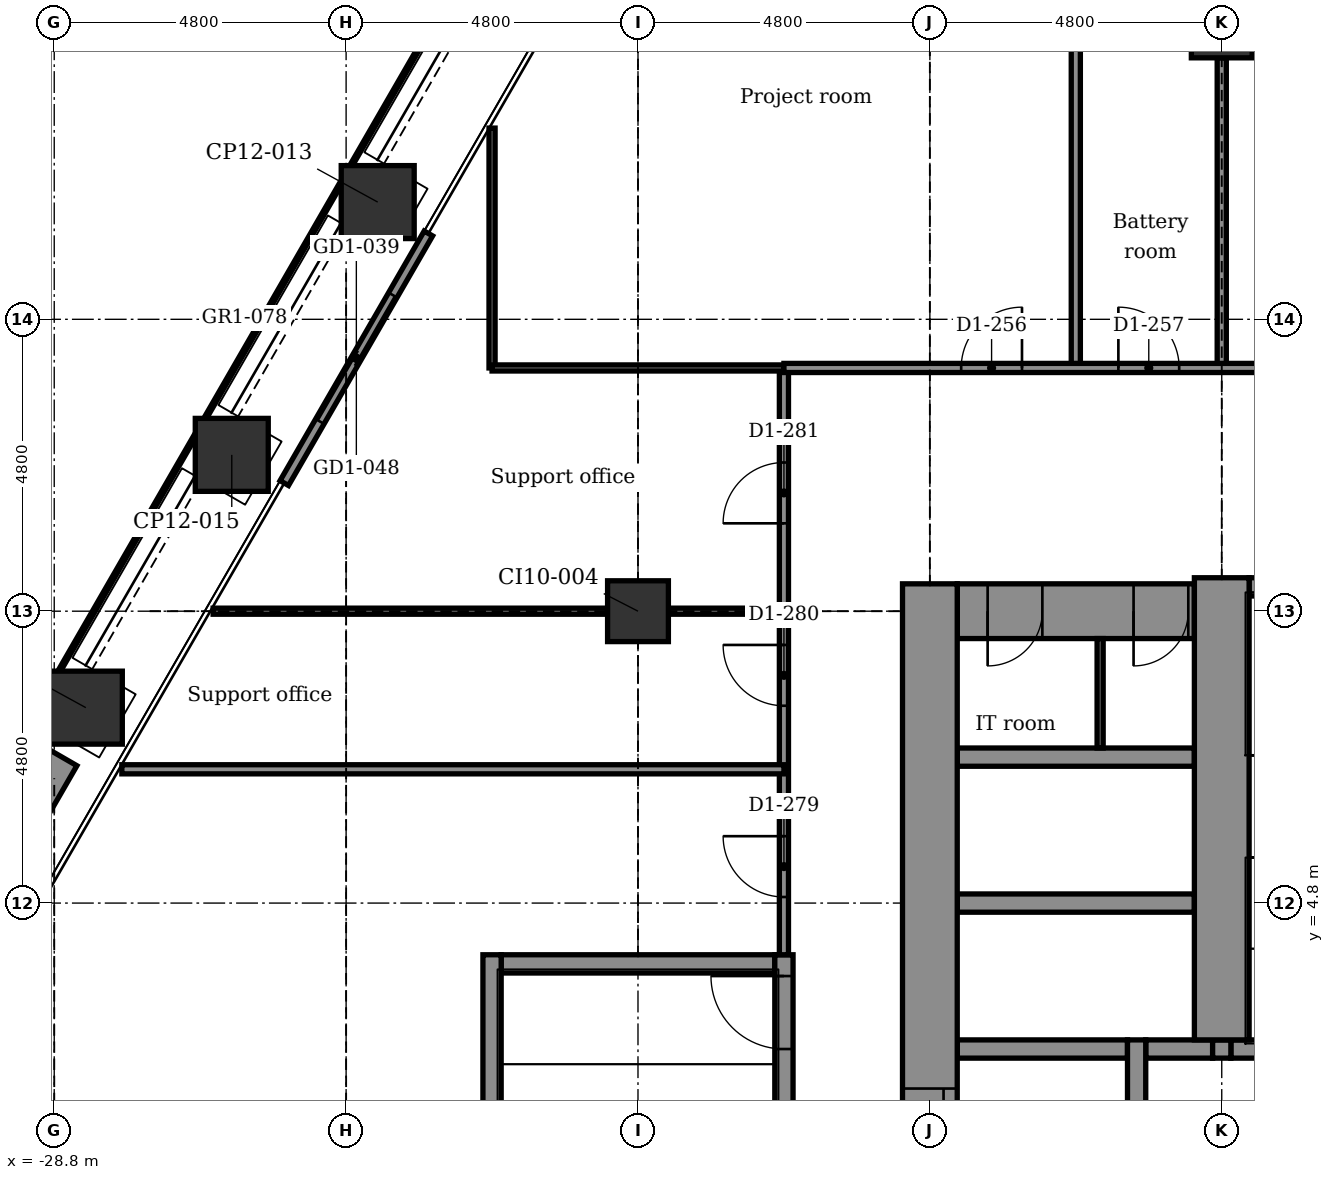
"""IFC4 building model, lengths in metres.
Left out: names, types, materials, properties, quantities, classifications, styles, units other than length and angle.
Written with IfcOpenShell. Run it as: python <this file> out.ifc"""

import sys

from ifc_helpers import new_model, si_unit, direction, frame, frame_2d, origin, origin_2d, place, context, subcontext, project, spatial, rectangle, extrude, element, fill, save


model = new_model("IFC4")
c1 = context("Model", 3, precision=1e-05, world=origin(), true_north=direction((0.0, 1.0)))
c2 = subcontext(c1, "Body", "Model", "MODEL_VIEW")
j1 = project(units=[si_unit("LENGTHUNIT", "METRE"), si_unit("PLANEANGLEUNIT", "RADIAN")], contexts=[c1])
p1 = place(None, origin())
s1 = spatial("IfcSite", under=j1, at=p1, CompositionType="ELEMENT")
p2 = place(p1, origin())
s2 = spatial("IfcBuilding", under=s1, at=p2, CompositionType="ELEMENT")
p3 = place(p2, frame((0.0, 0.0, 95.9)))
s3 = spatial("IfcBuildingStorey", under=s2, at=p3, CompositionType="ELEMENT", Elevation=95.9)
for number, where, z_axis, x_axis in (
    (1, (-28.28, 8.014, -0.2), (0.0, 0.0, 1.0), (0.5, 0.866, 0.0)),
    (2, (-25.88, 12.171, -0.2), (0.0, 0.0, 1.0), (0.5, 0.866, 0.0)),
    (3, (-23.48, 16.328, -0.2), (0.0, 0.0, 1.0), (0.5, 0.866, 0.0)),
):
    element("IfcColumn", number, at=place(p3, frame(where, z_axis=z_axis, x_axis=x_axis)), inside=s3, PredefinedType="COLUMN", context=c2, shape_type="SweptSolid", body=[
        extrude(rectangle(XDim=1.2, YDim=1.2, at=origin_2d()), origin(), (0.0, 0.0, 1.0), 4.5),
    ])
for number, where, z_axis, x_axis in (
    (4, (-19.2, 9.6, -0.2), (0.0, 0.0, 1.0), (1.0, 0.0, 0.0)),
    (5, (-9.6, 19.2, -0.2), (0.0, 0.0, 1.0), (1.0, 0.0, 0.0)),
):
    element("IfcColumn", number, at=place(p3, frame(where, z_axis=z_axis, x_axis=x_axis)), inside=s3, PredefinedType="COLUMN", context=c2, shape_type="SweptSolid", body=[
        extrude(rectangle(XDim=1.0, YDim=1.0, at=origin_2d()), origin(), (0.0, 0.0, 1.0), 4.5),
    ])
p4 = place(p3, frame((-13.95, 2.4, -0.2), z_axis=(0.0, 0.0, 1.0), x_axis=(1.0, 0.0, 0.0)))
e6 = element("IfcWall", 6, at=p4, inside=s3, PredefinedType="STANDARD", context=c2, shape_type="SweptSolid", body=[
    extrude(rectangle(XDim=2.8, YDim=0.3, at=frame_2d((1.4, 0.0))), origin(), (0.0, 0.0, 1.0), 4.5),
])
p5 = place(p3, frame((-10.85, 2.4, -0.2), z_axis=(0.0, 0.0, 1.0), x_axis=(1.0, 0.0, 0.0)))
e7 = element("IfcWall", 7, at=p5, inside=s3, PredefinedType="STANDARD", context=c2, shape_type="SweptSolid", body=[
    extrude(rectangle(XDim=1.1, YDim=0.3, at=frame_2d((0.55, 0.0))), origin(), (0.0, 0.0, 1.0), 4.5),
])
p6 = place(p3, frame((-9.45, 2.4, -0.2), z_axis=(0.0, 0.0, 1.0), x_axis=(1.0, 0.0, 0.0)))
e8 = element("IfcWall", 8, at=p6, inside=s3, PredefinedType="STANDARD", context=c2, shape_type="SweptSolid", body=[
    extrude(rectangle(XDim=1.9, YDim=0.3, at=frame_2d((0.95, 0.0))), origin(), (0.0, 0.0, 1.0), 4.5),
])
p7 = place(p3, frame((-21.45, 3.8, -0.2), z_axis=(0.0, 0.0, 1.0), x_axis=(1.0, 0.0, 0.0)))
e9 = element("IfcWall", 9, at=p7, inside=s3, PredefinedType="STANDARD", context=c2, shape_type="SweptSolid", body=[
    extrude(rectangle(XDim=4.5, YDim=0.3, at=frame_2d((2.25, 0.0))), origin(), (0.0, 0.0, 1.0), 4.5),
])
for number, where, z_axis, x_axis in (
    (10, (-13.95, 4.8, -0.2), (0.0, 0.0, 1.0), (1.0, 0.0, 0.0)),
    (11, (-13.95, 7.2, -0.2), (0.0, 0.0, 1.0), (1.0, 0.0, 0.0)),
):
    element("IfcWall", number, at=place(p3, frame(where, z_axis=z_axis, x_axis=x_axis)), inside=s3, PredefinedType="STANDARD", context=c2, shape_type="SweptSolid", body=[
        extrude(rectangle(XDim=3.9, YDim=0.3, at=frame_2d((1.95, 0.0))), origin(), (0.0, 0.0, 1.0), 4.5),
    ])
p8 = place(p3, frame((-13.95, 9.6, -0.2), z_axis=(0.0, 0.0, 1.0), x_axis=(1.0, 0.0, 0.0)))
e12 = element("IfcWall", 12, at=p8, inside=s3, PredefinedType="SHEAR", context=c2, shape_type="SweptSolid", body=[
    extrude(rectangle(XDim=3.9, YDim=0.9, at=frame_2d((1.95, 0.0))), origin(), (0.0, 0.0, 1.0), 4.5),
])
p9 = place(p8, frame((0.5, 0.0, 0.2)))
e13 = element("IfcOpeningElement", 13, at=p9, cuts=e12, PredefinedType="OPENING", context=c2, shape_type="SweptSolid", body=[
    extrude(rectangle(XDim=0.9, YDim=2.1, at=frame_2d((0.45, 1.05))), frame((0.0, 0.46, 0.0), z_axis=(0.0, -1.0, 0.0), x_axis=(1.0, 0.0, 0.0)), (0.0, 0.0, 1.0), 0.92),
])
p10 = place(p8, frame((2.9, 0.0, 0.2)))
e14 = element("IfcOpeningElement", 14, at=p10, cuts=e12, PredefinedType="OPENING", context=c2, shape_type="SweptSolid", body=[
    extrude(rectangle(XDim=0.9, YDim=2.1, at=frame_2d((0.45, 1.05))), frame((0.0, 0.46, 0.0), z_axis=(0.0, -1.0, 0.0), x_axis=(1.0, 0.0, 0.0)), (0.0, 0.0, 1.0), 0.92),
])
p11 = place(p3, frame((-9.15, 10.0, -0.2), z_axis=(0.0, 0.0, 1.0), x_axis=(1.0, 0.0, 0.0)))
e15 = element("IfcWall", 15, at=p11, inside=s3, PredefinedType="STANDARD", context=c2, shape_type="SweptSolid", body=[
    extrude(rectangle(XDim=3.9, YDim=0.3, at=frame_2d((1.95, 0.0))), origin(), (0.0, 0.0, 1.0), 4.5),
])
p12 = place(p3, frame((-21.6, -3.95, -0.2), z_axis=(0.0, 0.0, 1.0), x_axis=(0.0, 1.0, 0.0)))
e16 = element("IfcWall", 16, at=p12, inside=s3, PredefinedType="STANDARD", context=c2, shape_type="SweptSolid", body=[
    extrude(rectangle(XDim=7.9, YDim=0.3, at=frame_2d((3.95, 0.0))), origin(), (0.0, 0.0, 1.0), 4.5),
])
p13 = place(p3, frame((-16.8, -3.95, -0.2), z_axis=(0.0, 0.0, 1.0), x_axis=(0.0, 1.0, 0.0)))
e17 = element("IfcWall", 17, at=p13, inside=s3, PredefinedType="STANDARD", context=c2, shape_type="SweptSolid", body=[
    extrude(rectangle(XDim=7.9, YDim=0.3, at=frame_2d((3.95, 0.0))), origin(), (0.0, 0.0, 1.0), 4.5),
])
p14 = place(p13, frame((6.35, 0.0, 0.2)))
e18 = element("IfcOpeningElement", 18, at=p14, cuts=e17, PredefinedType="OPENING", context=c2, shape_type="SweptSolid", body=[
    extrude(rectangle(XDim=1.2, YDim=2.1, at=frame_2d((0.6, 1.05))), frame((0.0, 0.16, 0.0), z_axis=(0.0, -1.0, 0.0), x_axis=(1.0, 0.0, 0.0)), (0.0, 0.0, 1.0), 0.32),
])
p15 = place(p3, frame((-14.4, -10.05, -0.2), z_axis=(0.0, 0.0, 1.0), x_axis=(0.0, 1.0, 0.0)))
e19 = element("IfcWall", 19, at=p15, inside=s3, PredefinedType="SHEAR", context=c2, shape_type="SweptSolid", body=[
    extrude(rectangle(XDim=20.1, YDim=0.9, at=frame_2d((10.05, 0.0))), origin(), (0.0, 0.0, 1.0), 4.5),
])
p16 = place(p15, frame((3.5, 0.0, 0.2)))
e20 = element("IfcOpeningElement", 20, at=p16, cuts=e19, PredefinedType="OPENING", context=c2, shape_type="SweptSolid", body=[
    extrude(rectangle(XDim=1.1, YDim=2.1, at=frame_2d((0.55, 1.05))), frame((0.0, 0.46, 0.0), z_axis=(0.0, -1.0, 0.0), x_axis=(1.0, 0.0, 0.0)), (0.0, 0.0, 1.0), 0.92),
])
p17 = place(p15, frame((5.9, 0.0, 0.2)))
e21 = element("IfcOpeningElement", 21, at=p17, cuts=e19, PredefinedType="OPENING", context=c2, shape_type="SweptSolid", body=[
    extrude(rectangle(XDim=1.1, YDim=2.1, at=frame_2d((0.55, 1.05))), frame((0.0, 0.46, 0.0), z_axis=(0.0, -1.0, 0.0), x_axis=(1.0, 0.0, 0.0)), (0.0, 0.0, 1.0), 0.92),
])
p18 = place(p15, frame((8.3, 0.0, 0.2)))
e22 = element("IfcOpeningElement", 22, at=p18, cuts=e19, PredefinedType="OPENING", context=c2, shape_type="SweptSolid", body=[
    extrude(rectangle(XDim=1.1, YDim=2.1, at=frame_2d((0.55, 1.05))), frame((0.0, 0.46, 0.0), z_axis=(0.0, -1.0, 0.0), x_axis=(1.0, 0.0, 0.0)), (0.0, 0.0, 1.0), 0.92),
])
p19 = place(p15, frame((10.7, 0.0, 0.2)))
e23 = element("IfcOpeningElement", 23, at=p19, cuts=e19, PredefinedType="OPENING", context=c2, shape_type="SweptSolid", body=[
    extrude(rectangle(XDim=1.1, YDim=2.1, at=frame_2d((0.55, 1.05))), frame((0.0, 0.46, 0.0), z_axis=(0.0, -1.0, 0.0), x_axis=(1.0, 0.0, 0.0)), (0.0, 0.0, 1.0), 0.92),
])
p20 = place(p3, frame((-11.0, -2.55, -0.2), z_axis=(0.0, 0.0, 1.0), x_axis=(0.0, 1.0, 0.0)))
e24 = element("IfcWall", 24, at=p20, inside=s3, PredefinedType="STANDARD", context=c2, shape_type="SweptSolid", body=[
    extrude(rectangle(XDim=5.1, YDim=0.3, at=frame_2d((2.55, 0.0))), origin(), (0.0, 0.0, 1.0), 4.5),
])
p21 = place(p3, frame((-9.6, 2.25, -0.2), z_axis=(0.0, 0.0, 1.0), x_axis=(0.0, 1.0, 0.0)))
e25 = element("IfcWall", 25, at=p21, inside=s3, PredefinedType="STANDARD", context=c2, shape_type="SweptSolid", body=[
    extrude(rectangle(XDim=0.3, YDim=0.3, at=frame_2d((0.15, 0.0))), origin(), (0.0, 0.0, 1.0), 4.5),
])
p22 = place(p3, frame((-9.6, 2.55, -0.2), z_axis=(0.0, 0.0, 1.0), x_axis=(0.0, 1.0, 0.0)))
e26 = element("IfcWall", 26, at=p22, inside=s3, PredefinedType="SHEAR", context=c2, shape_type="SweptSolid", body=[
    extrude(rectangle(XDim=7.6, YDim=0.9, at=frame_2d((3.8, 0.0))), origin(), (0.0, 0.0, 1.0), 4.5),
])
p23 = place(p3, frame((-25.017, 11.707, 0.0), z_axis=(0.0, 0.0, 1.0), x_axis=(0.499978080042, 0.866038058908, 0.0)))
e27 = element("IfcWall", 27, at=p23, inside=s3, PredefinedType="PARTITIONING", context=c2, shape_type="SweptSolid", body=[
    extrude(rectangle(XDim=4.74, YDim=0.16, at=frame_2d((2.37, 0.0))), origin(), (0.0, 0.0, 1.0), 4.3),
])
p24 = place(p23, frame((1.17, 0.0, 0.0)))
e28 = element("IfcOpeningElement", 28, at=p24, cuts=e27, PredefinedType="OPENING", context=c2, shape_type="SweptSolid", body=[
    extrude(rectangle(XDim=2.4, YDim=2.4, at=frame_2d((1.2, 1.2))), frame((0.0, 0.09, 0.0), z_axis=(0.0, -1.0, 0.0), x_axis=(1.0, 0.0, 0.0)), (0.0, 0.0, 1.0), 0.18),
])
p25 = place(p3, frame((-30.187, 4.611, 0.0), z_axis=(0.0, 0.0, 1.0), x_axis=(0.499990139034, 0.866031096941, 0.0)))
e29 = element("IfcWall", 29, at=p25, inside=s3, PredefinedType="USERDEFINED", context=c2, shape_type="SweptSolid", body=[
    extrude(rectangle(XDim=3.0, YDim=0.6, at=frame_2d((1.5, 0.0))), origin(), (0.0, 0.0, 1.0), 0.7),
])
p26 = place(p3, frame((-9.6, 13.6, 0.0), z_axis=(0.0, 0.0, 1.0), x_axis=(0.0, 1.0, 0.0)))
e30 = element("IfcWall", 30, at=p26, inside=s3, PredefinedType="PARTITIONING", context=c2, shape_type="SweptSolid", body=[
    extrude(rectangle(XDim=5.1, YDim=0.15, at=frame_2d((2.55, 0.0))), origin(), (0.0, 0.0, 1.0), 3.843),
])
p27 = place(p3, frame((-11.6, 7.35, 0.0), z_axis=(0.0, 0.0, 1.0), x_axis=(0.0, 1.0, 0.0)))
e31 = element("IfcWall", 31, at=p27, inside=s3, PredefinedType="PARTITIONING", context=c2, shape_type="SweptSolid", body=[
    extrude(rectangle(XDim=1.8, YDim=0.1, at=frame_2d((0.9, 0.0))), origin(), (0.0, 0.0, 1.0), 4.3),
])
p28 = place(p3, frame((-12.0, 13.6, 0.0), z_axis=(0.0, 0.0, 1.0), x_axis=(0.0, 1.0, 0.0)))
e32 = element("IfcWall", 32, at=p28, inside=s3, PredefinedType="PARTITIONING", context=c2, shape_type="SweptSolid", body=[
    extrude(rectangle(XDim=13.828, YDim=0.15, at=frame_2d((6.914, 0.0))), origin(), (0.0, 0.0, 1.0), 4.3),
])
p29 = place(p3, frame((-16.8, 3.95, 0.0), z_axis=(0.0, 0.0, 1.0), x_axis=(0.0, 1.0, 0.0)))
e33 = element("IfcWall", 33, at=p29, inside=s3, PredefinedType="PARTITIONING", context=c2, shape_type="SweptSolid", body=[
    extrude(rectangle(XDim=9.65, YDim=0.15, at=frame_2d((4.825, 0.0))), origin(), (0.0, 0.0, 1.0), 4.3),
])
p30 = place(p29, frame((0.95, 0.0, 0.0)))
e34 = element("IfcOpeningElement", 34, at=p30, cuts=e33, PredefinedType="OPENING", context=c2, shape_type="SweptSolid", body=[
    extrude(rectangle(XDim=1.0, YDim=2.1, at=frame_2d((0.5, 1.05))), frame((0.0, 0.085, 0.0), z_axis=(0.0, -1.0, 0.0), x_axis=(1.0, 0.0, 0.0)), (0.0, 0.0, 1.0), 0.17),
])
p31 = place(p29, frame((4.095, 0.0, 0.0)))
e35 = element("IfcOpeningElement", 35, at=p31, cuts=e33, PredefinedType="OPENING", context=c2, shape_type="SweptSolid", body=[
    extrude(rectangle(XDim=1.0, YDim=2.1, at=frame_2d((0.5, 1.05))), frame((0.0, 0.085, 0.0), z_axis=(0.0, -1.0, 0.0), x_axis=(1.0, 0.0, 0.0)), (0.0, 0.0, 1.0), 0.17),
])
p32 = place(p29, frame((7.095, 0.0, 0.0)))
e36 = element("IfcOpeningElement", 36, at=p32, cuts=e33, PredefinedType="OPENING", context=c2, shape_type="SweptSolid", body=[
    extrude(rectangle(XDim=1.0, YDim=2.1, at=frame_2d((0.5, 1.05))), frame((0.0, 0.085, 0.0), z_axis=(0.0, -1.0, 0.0), x_axis=(1.0, 0.0, 0.0)), (0.0, 0.0, 1.0), 0.17),
])
p33 = place(p3, frame((-21.6, 13.6, 0.0), z_axis=(0.0, 0.0, 1.0), x_axis=(0.0, 1.0, 0.0)))
e37 = element("IfcWall", 37, at=p33, inside=s3, PredefinedType="PARTITIONING", context=c2, shape_type="SweptSolid", body=[
    extrude(rectangle(XDim=3.945, YDim=0.1, at=frame_2d((1.972, 0.0))), origin(), (0.0, 0.0, 1.0), 4.3),
])
p34 = place(p3, frame((-27.688, 7.0, 0.0), z_axis=(0.0, 0.0, 1.0), x_axis=(1.0, 0.0, 0.0)))
e38 = element("IfcWall", 38, at=p34, inside=s3, PredefinedType="PARTITIONING", context=c2, shape_type="SweptSolid", body=[
    extrude(rectangle(XDim=10.888, YDim=0.15, at=frame_2d((5.444, 0.0))), origin(), (0.0, 0.0, 1.0), 4.3),
])
p35 = place(p3, frame((-26.187, 9.6, 0.0), z_axis=(0.0, 0.0, 1.0), x_axis=(1.0, 0.0, 0.0)))
e39 = element("IfcWall", 39, at=p35, inside=s3, PredefinedType="PARTITIONING", context=c2, shape_type="SweptSolid", body=[
    extrude(rectangle(XDim=6.487, YDim=0.1, at=frame_2d((3.243, 0.0))), origin(), (0.0, 0.0, 1.0), 3.692),
])
p36 = place(p3, frame((-18.7, 9.6, 0.0), z_axis=(0.0, 0.0, 1.0), x_axis=(1.0, 0.0, 0.0)))
e40 = element("IfcWall", 40, at=p36, inside=s3, PredefinedType="PARTITIONING", context=c2, shape_type="SweptSolid", body=[
    extrude(rectangle(XDim=1.9, YDim=0.1, at=frame_2d((0.95, 0.0))), origin(), (0.0, 0.0, 1.0), 3.692),
])
p37 = place(p3, frame((-21.6, 13.6, 0.0), z_axis=(0.0, 0.0, 1.0), x_axis=(1.0, 0.0, 0.0)))
e41 = element("IfcWall", 41, at=p37, inside=s3, PredefinedType="PARTITIONING", context=c2, shape_type="SweptSolid", body=[
    extrude(rectangle(XDim=4.8, YDim=0.1, at=frame_2d((2.4, 0.0))), origin(), (0.0, 0.0, 1.0), 4.3),
])
p38 = place(p3, frame((-16.8, 13.6, 0.0), z_axis=(0.0, 0.0, 1.0), x_axis=(1.0, 0.0, 0.0)))
e42 = element("IfcWall", 42, at=p38, inside=s3, PredefinedType="PARTITIONING", context=c2, shape_type="SweptSolid", body=[
    extrude(rectangle(XDim=38.4, YDim=0.15, at=frame_2d((19.2, 0.0))), origin(), (0.0, 0.0, 1.0), 4.3),
])
p39 = place(p38, frame((2.915, 0.0, 0.0)))
e43 = element("IfcOpeningElement", 43, at=p39, cuts=e42, PredefinedType="OPENING", context=c2, shape_type="SweptSolid", body=[
    extrude(rectangle(XDim=1.0, YDim=2.1, at=frame_2d((0.5, 1.05))), frame((0.0, 0.085, 0.0), z_axis=(0.0, -1.0, 0.0), x_axis=(1.0, 0.0, 0.0)), (0.0, 0.0, 1.0), 0.17),
])
p40 = place(p38, frame((5.5, 0.0, 0.0)))
e44 = element("IfcOpeningElement", 44, at=p40, cuts=e42, PredefinedType="OPENING", context=c2, shape_type="SweptSolid", body=[
    extrude(rectangle(XDim=1.0, YDim=2.1, at=frame_2d((0.5, 1.05))), frame((0.0, 0.085, 0.0), z_axis=(0.0, -1.0, 0.0), x_axis=(1.0, 0.0, 0.0)), (0.0, 0.0, 1.0), 0.17),
])
p41 = place(p38, frame((10.3, 0.0, 0.0)))
e45 = element("IfcOpeningElement", 45, at=p41, cuts=e42, PredefinedType="OPENING", context=c2, shape_type="SweptSolid", body=[
    extrude(rectangle(XDim=1.0, YDim=2.1, at=frame_2d((0.5, 1.05))), frame((0.0, 0.085, 0.0), z_axis=(0.0, -1.0, 0.0), x_axis=(1.0, 0.0, 0.0)), (0.0, 0.0, 1.0), 0.17),
])
p42 = place(p38, frame((14.925, 0.0, 0.0)))
e46 = element("IfcOpeningElement", 46, at=p42, cuts=e42, PredefinedType="OPENING", context=c2, shape_type="SweptSolid", body=[
    extrude(rectangle(XDim=1.0, YDim=2.1, at=frame_2d((0.5, 1.05))), frame((0.0, 0.085, 0.0), z_axis=(0.0, -1.0, 0.0), x_axis=(1.0, 0.0, 0.0)), (0.0, 0.0, 1.0), 0.17),
])
p43 = place(p38, frame((17.975, 0.0, 0.0)))
e47 = element("IfcOpeningElement", 47, at=p43, cuts=e42, PredefinedType="OPENING", context=c2, shape_type="SweptSolid", body=[
    extrude(rectangle(XDim=1.0, YDim=2.1, at=frame_2d((0.5, 1.05))), frame((0.0, 0.085, 0.0), z_axis=(0.0, -1.0, 0.0), x_axis=(1.0, 0.0, 0.0)), (0.0, 0.0, 1.0), 0.17),
])
p44 = place(p38, frame((23.5, 0.0, 0.0)))
e48 = element("IfcOpeningElement", 48, at=p44, cuts=e42, PredefinedType="OPENING", context=c2, shape_type="SweptSolid", body=[
    extrude(rectangle(XDim=1.0, YDim=2.1, at=frame_2d((0.5, 1.05))), frame((0.0, 0.085, 0.0), z_axis=(0.0, -1.0, 0.0), x_axis=(1.0, 0.0, 0.0)), (0.0, 0.0, 1.0), 0.17),
])
p45 = place(p38, frame((29.5, 0.0, 0.0)))
e49 = element("IfcOpeningElement", 49, at=p45, cuts=e42, PredefinedType="OPENING", context=c2, shape_type="SweptSolid", body=[
    extrude(rectangle(XDim=1.0, YDim=2.1, at=frame_2d((0.5, 1.05))), frame((0.0, 0.085, 0.0), z_axis=(0.0, -1.0, 0.0), x_axis=(1.0, 0.0, 0.0)), (0.0, 0.0, 1.0), 0.17),
])
p46 = place(p24, origin())
e50 = element("IfcDoor", 50, at=p46, inside=s3, OperationType="DOUBLE_DOOR_SLIDING", PredefinedType="DOOR", context=c2, shape_type="SweptSolid", body=[
    extrude(rectangle(XDim=2.4, YDim=2.4, at=frame_2d((1.2, 1.2))), frame((0.0, 0.025, 0.0), z_axis=(0.0, -1.0, 0.0), x_axis=(1.0, 0.0, 0.0)), (0.0, 0.0, 1.0), 0.05),
])
fill(e28, e50)
p47 = place(p39, origin())
e51 = element("IfcDoor", 51, at=p47, inside=s3, OperationType="SINGLE_SWING_RIGHT", PredefinedType="DOOR", context=c2, shape_type="SweptSolid", body=[
    extrude(rectangle(XDim=1.0, YDim=2.1, at=frame_2d((0.5, 1.05))), frame((0.0, 0.025, 0.0), z_axis=(0.0, -1.0, 0.0), x_axis=(1.0, 0.0, 0.0)), (0.0, 0.0, 1.0), 0.05),
])
fill(e43, e51)
p48 = place(p40, origin())
e52 = element("IfcDoor", 52, at=p48, inside=s3, OperationType="SINGLE_SWING_LEFT", PredefinedType="DOOR", context=c2, shape_type="SweptSolid", body=[
    extrude(rectangle(XDim=1.0, YDim=2.1, at=frame_2d((0.5, 1.05))), frame((0.0, 0.025, 0.0), z_axis=(0.0, -1.0, 0.0), x_axis=(1.0, 0.0, 0.0)), (0.0, 0.0, 1.0), 0.05),
])
fill(e44, e52)
p49 = place(p30, origin())
e53 = element("IfcDoor", 53, at=p49, inside=s3, OperationType="SINGLE_SWING_RIGHT", PredefinedType="DOOR", context=c2, shape_type="SweptSolid", body=[
    extrude(rectangle(XDim=1.0, YDim=2.1, at=frame_2d((0.5, 1.05))), frame((0.0, 0.025, 0.0), z_axis=(0.0, -1.0, 0.0), x_axis=(1.0, 0.0, 0.0)), (0.0, 0.0, 1.0), 0.05),
])
fill(e34, e53)
p50 = place(p31, origin())
e54 = element("IfcDoor", 54, at=p50, inside=s3, OperationType="SINGLE_SWING_RIGHT", PredefinedType="DOOR", context=c2, shape_type="SweptSolid", body=[
    extrude(rectangle(XDim=1.0, YDim=2.1, at=frame_2d((0.5, 1.05))), frame((0.0, 0.025, 0.0), z_axis=(0.0, -1.0, 0.0), x_axis=(1.0, 0.0, 0.0)), (0.0, 0.0, 1.0), 0.05),
])
fill(e35, e54)
p51 = place(p32, origin())
e55 = element("IfcDoor", 55, at=p51, inside=s3, OperationType="SINGLE_SWING_LEFT", PredefinedType="DOOR", context=c2, shape_type="SweptSolid", body=[
    extrude(rectangle(XDim=1.0, YDim=2.1, at=frame_2d((0.5, 1.05))), frame((0.0, 0.025, 0.0), z_axis=(0.0, -1.0, 0.0), x_axis=(1.0, 0.0, 0.0)), (0.0, 0.0, 1.0), 0.05),
])
fill(e36, e55)
p52 = place(p19, origin())
e56 = element("IfcDoor", 56, at=p52, inside=s3, OperationType="DOUBLE_DOOR_SLIDING", PredefinedType="DOOR", context=c2, shape_type="SweptSolid", body=[
    extrude(rectangle(XDim=1.1, YDim=2.1, at=frame_2d((0.55, 1.05))), frame((0.0, 0.025, 0.0), z_axis=(0.0, -1.0, 0.0), x_axis=(1.0, 0.0, 0.0)), (0.0, 0.0, 1.0), 0.05),
])
fill(e23, e56)
p53 = place(p14, origin())
e57 = element("IfcDoor", 57, at=p53, inside=s3, OperationType="SINGLE_SWING_RIGHT", PredefinedType="DOOR", context=c2, shape_type="SweptSolid", body=[
    extrude(rectangle(XDim=1.2, YDim=2.1, at=frame_2d((0.6, 1.05))), frame((0.0, 0.025, 0.0), z_axis=(0.0, -1.0, 0.0), x_axis=(1.0, 0.0, 0.0)), (0.0, 0.0, 1.0), 0.05),
])
fill(e18, e57)
p54 = place(p9, frame((0.9, 0.0, 0.0), z_axis=(0.0, 0.0, 1.0), x_axis=(-1.0, 0.0, 0.0)))
e58 = element("IfcDoor", 58, at=p54, inside=s3, OperationType="SINGLE_SWING_LEFT", PredefinedType="DOOR", context=c2, shape_type="SweptSolid", body=[
    extrude(rectangle(XDim=0.9, YDim=2.1, at=frame_2d((0.45, 1.05))), frame((0.0, 0.025, 0.0), z_axis=(0.0, -1.0, 0.0), x_axis=(1.0, 0.0, 0.0)), (0.0, 0.0, 1.0), 0.05),
])
fill(e13, e58)
p55 = place(p10, frame((0.9, 0.0, 0.0), z_axis=(0.0, 0.0, 1.0), x_axis=(-1.0, 0.0, 0.0)))
e59 = element("IfcDoor", 59, at=p55, inside=s3, OperationType="SINGLE_SWING_LEFT", PredefinedType="DOOR", context=c2, shape_type="SweptSolid", body=[
    extrude(rectangle(XDim=0.9, YDim=2.1, at=frame_2d((0.45, 1.05))), frame((0.0, 0.025, 0.0), z_axis=(0.0, -1.0, 0.0), x_axis=(1.0, 0.0, 0.0)), (0.0, 0.0, 1.0), 0.05),
])
fill(e14, e59)
save(model, sys.argv[1])
